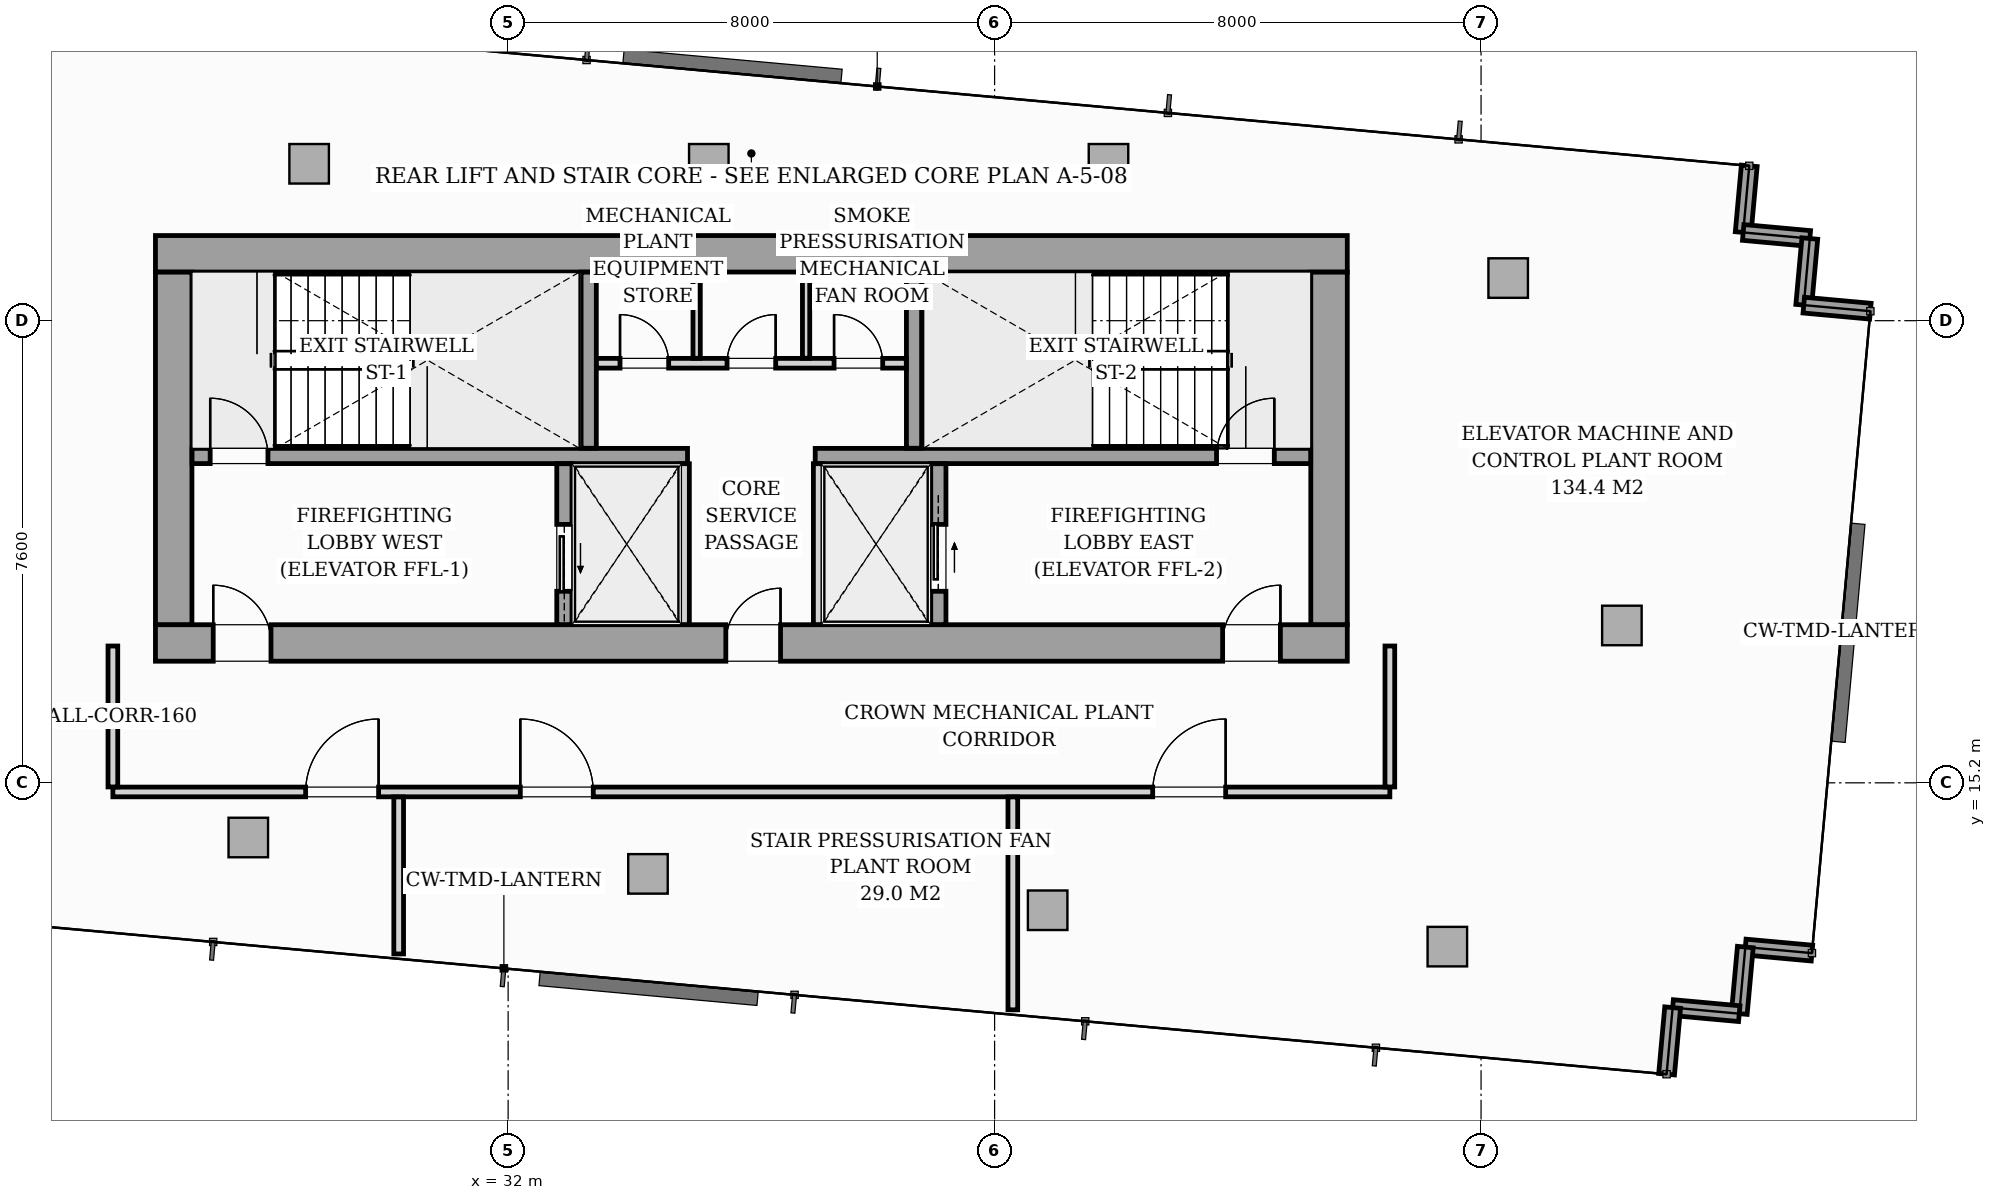
"""IFC4 building model, lengths in metres.
Left out: names, types, materials, properties, quantities, classifications, styles, units other than length and angle.
Written with IfcOpenShell. Run it as: python <this file> out.ifc"""

import sys

from ifc_helpers import new_model, si_unit, direction, frame, frame_2d, origin, origin_2d, place, context, subcontext, project, spatial, rectangle, i_section, extrude, source, transform, mapped, element, fill, save


model = new_model("IFC4")
c1 = context("Model", 3, precision=1e-05, world=origin(), true_north=direction((0.0, 1.0)))
c2 = subcontext(c1, "Body", "Model", "MODEL_VIEW")
j1 = project(units=[si_unit("LENGTHUNIT", "METRE"), si_unit("PLANEANGLEUNIT", "RADIAN")], contexts=[c1])
p1 = place(None, origin())
s1 = spatial("IfcSite", under=j1, at=p1, CompositionType="ELEMENT")
p2 = place(p1, origin())
s2 = spatial("IfcBuilding", under=s1, at=p2, CompositionType="ELEMENT")
p3 = place(p2, frame((0.0, 0.0, 283.8)))
s3 = spatial("IfcBuildingStorey", under=s2, at=p3, CompositionType="ELEMENT", Elevation=283.8)
m1 = source(origin(), c2, "Body", "SweptSolid", [
    extrude(i_section(OverallWidth=0.404, OverallDepth=0.407, WebThickness=0.027, FlangeThickness=0.044, FilletRadius=0.018, at=origin_2d()), origin(), (0.0, 0.0, 1.0), 6.496),
])
for number, where, z_axis, x_axis in (
    (1, (26.4, 17.4, 0.002), (0.0, 0.0, 1.0), (1.0, 0.0, 0.0)),
    (2, (33.12, 17.4, 0.002), (0.0, 0.0, 1.0), (1.0, 0.0, 0.0)),
    (3, (38.88, 17.4, 0.002), (0.0, 0.0, 1.0), (1.0, 0.0, 0.0)),
    (4, (45.6, 17.4, 0.002), (0.0, 0.0, 1.0), (1.0, 0.0, 0.0)),
    (5, (26.4, 24.0, 0.002), (0.0, 0.0, 1.0), (1.0, 0.0, 0.0)),
    (6, (33.12, 24.0, 0.002), (0.0, 0.0, 1.0), (1.0, 0.0, 0.0)),
    (7, (38.88, 24.0, 0.002), (0.0, 0.0, 1.0), (1.0, 0.0, 0.0)),
    (8, (45.6, 24.0, 0.002), (0.0, 0.0, 1.0), (1.0, 0.0, 0.0)),
):
    element("IfcColumn", number, at=place(p3, frame(where, z_axis=z_axis, x_axis=x_axis)), inside=s3, PredefinedType="PILASTER", context=c2, shape_type="MappedRepresentation", body=[
        mapped(m1, transform((0.0, 0.0, 0.0), scale=1.0)),
    ])
m2 = source(origin(), c2, "Body", "SweptSolid", [
    extrude(rectangle(XDim=0.65, YDim=0.65, at=origin_2d()), origin(), (0.0, 0.0, 1.0), 6.496),
])
for number, where, z_axis, x_axis in (
    (9, (27.727, 14.301, 0.002), (0.0, 0.0, 1.0), (0.996, -0.091, 0.0)),
    (10, (34.3, 13.703, 0.002), (0.0, 0.0, 1.0), (0.996, -0.091, 0.0)),
    (11, (40.873, 13.104, 0.002), (0.0, 0.0, 1.0), (0.996, -0.091, 0.0)),
    (12, (47.445, 12.506, 0.002), (0.0, 0.0, 1.0), (0.996, -0.091, 0.0)),
    (13, (28.728, 25.38, 0.002), (0.0, 0.0, 1.0), (0.996, -0.091, 0.0)),
    (14, (35.3, 25.38, 0.002), (0.0, 0.0, 1.0), (0.996, -0.091, 0.0)),
    (15, (41.873, 25.38, 0.002), (0.0, 0.0, 1.0), (0.996, -0.091, 0.0)),
    (16, (48.446, 23.501, 0.002), (0.0, 0.0, 1.0), (0.996, -0.091, 0.0)),
    (17, (50.316, 17.788, 0.002), (0.0, 0.0, 1.0), (0.996, -0.091, 0.0)),
):
    element("IfcColumn", number, at=place(p3, frame(where, z_axis=z_axis, x_axis=x_axis)), inside=s3, PredefinedType="COLUMN", context=c2, shape_type="MappedRepresentation", body=[
        mapped(m2, transform((0.0, 0.0, 0.0), scale=1.0)),
    ])
p4 = place(p3, frame((52.411, 25.346, 0.0), z_axis=(0.0, 0.0, 1.0), x_axis=(-0.09077588162, -0.995871346769, 0.0)))
e18 = element("IfcWall", 18, at=p4, inside=s3, PredefinedType="STANDARD", context=c2, shape_type="SweptSolid", body=[
    extrude(rectangle(XDim=1.1, YDim=0.26, at=frame_2d((0.55, 0.0))), origin(), (0.0, 0.0, 1.0), 6.22),
])
p5 = place(p3, frame((52.311, 24.251, 0.0), z_axis=(0.0, 0.0, 1.0), x_axis=(0.995893206468, -0.090535746043, 0.0)))
e19 = element("IfcWall", 19, at=p5, inside=s3, PredefinedType="STANDARD", context=c2, shape_type="SweptSolid", body=[
    extrude(rectangle(XDim=1.1, YDim=0.26, at=frame_2d((0.55, 0.0))), origin(), (0.0, 0.0, 1.0), 6.22),
])
for number, where, z_axis, x_axis in (
    (20, (53.406, 24.151, 0.0), (0.0, 0.0, 1.0), (-0.091, -0.996, 0.0)),
    (21, (53.307, 23.056, 0.0), (0.0, 0.0, 1.0), (0.996, -0.091, 0.0)),
    (22, (53.441, 12.4, 0.0), (0.0, 0.0, 1.0), (-0.996, 0.091, 0.0)),
    (23, (52.346, 12.5, 0.0), (0.0, 0.0, 1.0), (-0.091, -0.996, 0.0)),
    (24, (52.246, 11.404, 0.0), (0.0, 0.0, 1.0), (-0.996, 0.091, 0.0)),
    (25, (51.151, 11.504, 0.0), (0.0, 0.0, 1.0), (-0.091, -0.996, 0.0)),
):
    element("IfcWall", number, at=place(p3, frame(where, z_axis=z_axis, x_axis=x_axis)), inside=s3, PredefinedType="STANDARD", context=c2, shape_type="SweptSolid", body=[
        extrude(rectangle(XDim=1.1, YDim=0.26, at=frame_2d((0.55, 0.0))), origin(), (0.0, 0.0, 1.0), 6.22),
    ])
p6 = place(p3, frame((26.2, 17.5, 0.0), z_axis=(0.0, 0.0, 1.0), x_axis=(1.0, 0.0, 0.0)))
e26 = element("IfcWall", 26, at=p6, inside=s3, PredefinedType="SHEAR", context=c2, shape_type="SweptSolid", body=[
    extrude(rectangle(XDim=19.6, YDim=0.6, at=frame_2d((9.8, 0.0))), origin(), (0.0, 0.0, 1.0), 6.5),
])
p7 = place(p6, frame((0.95, 0.0, 0.0)))
e27 = element("IfcOpeningElement", 27, at=p7, cuts=e26, PredefinedType="OPENING", context=c2, shape_type="SweptSolid", body=[
    extrude(rectangle(XDim=0.95, YDim=2.06, at=frame_2d((0.475, 1.03))), frame((0.0, 0.31, 0.0), z_axis=(0.0, -1.0, 0.0), x_axis=(1.0, 0.0, 0.0)), (0.0, 0.0, 1.0), 0.62),
])
p8 = place(p6, frame((9.38, 0.0, 0.0)))
e28 = element("IfcOpeningElement", 28, at=p8, cuts=e26, PredefinedType="OPENING", context=c2, shape_type="SweptSolid", body=[
    extrude(rectangle(XDim=0.9, YDim=2.06, at=frame_2d((0.45, 1.03))), frame((0.0, 0.31, 0.0), z_axis=(0.0, -1.0, 0.0), x_axis=(1.0, 0.0, 0.0)), (0.0, 0.0, 1.0), 0.62),
])
p9 = place(p6, frame((17.55, 0.0, 0.0)))
e29 = element("IfcOpeningElement", 29, at=p9, cuts=e26, PredefinedType="OPENING", context=c2, shape_type="SweptSolid", body=[
    extrude(rectangle(XDim=0.95, YDim=2.06, at=frame_2d((0.475, 1.03))), frame((0.0, 0.31, 0.0), z_axis=(0.0, -1.0, 0.0), x_axis=(1.0, 0.0, 0.0)), (0.0, 0.0, 1.0), 0.62),
])
p10 = place(p3, frame((26.2, 23.9, 0.0), z_axis=(0.0, 0.0, 1.0), x_axis=(1.0, 0.0, 0.0)))
e30 = element("IfcWall", 30, at=p10, inside=s3, PredefinedType="SHEAR", context=c2, shape_type="SweptSolid", body=[
    extrude(rectangle(XDim=19.6, YDim=0.6, at=frame_2d((9.8, 0.0))), origin(), (0.0, 0.0, 1.0), 6.5),
])
for number, where, z_axis, x_axis in (
    (31, (26.5, 17.802, 0.0), (0.0, 0.0, 1.0), (0.0, 1.0, 0.0)),
    (32, (45.5, 17.802, 0.0), (0.0, 0.0, 1.0), (0.0, 1.0, 0.0)),
):
    element("IfcWall", number, at=place(p3, frame(where, z_axis=z_axis, x_axis=x_axis)), inside=s3, PredefinedType="SHEAR", context=c2, shape_type="SweptSolid", body=[
        extrude(rectangle(XDim=5.796, YDim=0.6, at=frame_2d((2.898, 0.0))), origin(), (0.0, 0.0, 1.0), 6.5),
    ])
p11 = place(p3, frame((26.802, 20.575, 0.0), z_axis=(0.0, 0.0, 1.0), x_axis=(1.0, 0.0, 0.0)))
e33 = element("IfcWall", 33, at=p11, inside=s3, PredefinedType="SOLIDWALL", context=c2, shape_type="SweptSolid", body=[
    extrude(rectangle(XDim=8.148, YDim=0.25, at=frame_2d((4.074, 0.0))), origin(), (0.0, 0.0, 1.0), 6.5),
])
p12 = place(p11, frame((0.298, 0.0, 0.0)))
e34 = element("IfcOpeningElement", 34, at=p12, cuts=e33, PredefinedType="OPENING", context=c2, shape_type="SweptSolid", body=[
    extrude(rectangle(XDim=0.95, YDim=2.06, at=frame_2d((0.475, 1.03))), frame((0.0, 0.135, 0.0), z_axis=(0.0, -1.0, 0.0), x_axis=(1.0, 0.0, 0.0)), (0.0, 0.0, 1.0), 0.27),
])
p13 = place(p3, frame((37.05, 20.575, 0.0), z_axis=(0.0, 0.0, 1.0), x_axis=(1.0, 0.0, 0.0)))
e35 = element("IfcWall", 35, at=p13, inside=s3, PredefinedType="SOLIDWALL", context=c2, shape_type="SweptSolid", body=[
    extrude(rectangle(XDim=8.148, YDim=0.25, at=frame_2d((4.074, 0.0))), origin(), (0.0, 0.0, 1.0), 6.5),
])
p14 = place(p13, frame((6.6, 0.0, 0.0)))
e36 = element("IfcOpeningElement", 36, at=p14, cuts=e35, PredefinedType="OPENING", context=c2, shape_type="SweptSolid", body=[
    extrude(rectangle(XDim=0.95, YDim=2.06, at=frame_2d((0.475, 1.03))), frame((0.0, 0.135, 0.0), z_axis=(0.0, -1.0, 0.0), x_axis=(1.0, 0.0, 0.0)), (0.0, 0.0, 1.0), 0.27),
])
for number, where, z_axis, x_axis in (
    (37, (33.325, 20.702, 0.0), (0.0, 0.0, 1.0), (0.0, 1.0, 0.0)),
    (38, (38.675, 20.702, 0.0), (0.0, 0.0, 1.0), (0.0, 1.0, 0.0)),
):
    element("IfcWall", number, at=place(p3, frame(where, z_axis=z_axis, x_axis=x_axis)), inside=s3, PredefinedType="SOLIDWALL", context=c2, shape_type="SweptSolid", body=[
        extrude(rectangle(XDim=2.896, YDim=0.25, at=frame_2d((1.448, 0.0))), origin(), (0.0, 0.0, 1.0), 6.5),
    ])
p15 = place(p3, frame((32.925, 17.802, 0.0), z_axis=(0.0, 0.0, 1.0), x_axis=(0.0, 1.0, 0.0)))
e39 = element("IfcWall", 39, at=p15, inside=s3, PredefinedType="SOLIDWALL", context=c2, shape_type="SweptSolid", body=[
    extrude(rectangle(XDim=2.646, YDim=0.25, at=frame_2d((1.323, 0.0))), origin(), (0.0, 0.0, 1.0), 6.5),
])
p16 = place(p15, frame((0.548, 0.0, 0.0)))
e40 = element("IfcOpeningElement", 40, at=p16, cuts=e39, PredefinedType="OPENING", context=c2, shape_type="SweptSolid", body=[
    extrude(rectangle(XDim=1.1, YDim=2.08, at=frame_2d((0.55, 1.04))), frame((0.0, 0.135, 0.0), z_axis=(0.0, -1.0, 0.0), x_axis=(1.0, 0.0, 0.0)), (0.0, 0.0, 1.0), 0.27),
])
for number, where, z_axis, x_axis in (
    (41, (34.9, 17.802, 0.0), (0.0, 0.0, 1.0), (0.0, 1.0, 0.0)),
    (42, (37.1, 17.802, 0.0), (0.0, 0.0, 1.0), (0.0, 1.0, 0.0)),
):
    element("IfcWall", number, at=place(p3, frame(where, z_axis=z_axis, x_axis=x_axis)), inside=s3, PredefinedType="PARTITIONING", context=c2, shape_type="SweptSolid", body=[
        extrude(rectangle(XDim=2.646, YDim=0.16, at=frame_2d((1.323, 0.0))), origin(), (0.0, 0.0, 1.0), 6.22),
    ])
p17 = place(p3, frame((39.075, 17.802, 0.0), z_axis=(0.0, 0.0, 1.0), x_axis=(0.0, 1.0, 0.0)))
e43 = element("IfcWall", 43, at=p17, inside=s3, PredefinedType="SOLIDWALL", context=c2, shape_type="SweptSolid", body=[
    extrude(rectangle(XDim=2.646, YDim=0.25, at=frame_2d((1.323, 0.0))), origin(), (0.0, 0.0, 1.0), 6.5),
])
p18 = place(p17, frame((0.548, 0.0, 0.0)))
e44 = element("IfcOpeningElement", 44, at=p18, cuts=e43, PredefinedType="OPENING", context=c2, shape_type="SweptSolid", body=[
    extrude(rectangle(XDim=1.1, YDim=2.08, at=frame_2d((0.55, 1.04))), frame((0.0, 0.135, 0.0), z_axis=(0.0, -1.0, 0.0), x_axis=(1.0, 0.0, 0.0)), (0.0, 0.0, 1.0), 0.27),
])
p19 = place(p3, frame((33.452, 22.1, 0.0), z_axis=(0.0, 0.0, 1.0), x_axis=(1.0, 0.0, 0.0)))
e45 = element("IfcWall", 45, at=p19, inside=s3, PredefinedType="PARTITIONING", context=c2, shape_type="SweptSolid", body=[
    extrude(rectangle(XDim=5.096, YDim=0.16, at=frame_2d((2.548, 0.0))), origin(), (0.0, 0.0, 1.0), 6.22),
])
p20 = place(p19, frame((0.388, 0.0, 0.0)))
e46 = element("IfcOpeningElement", 46, at=p20, cuts=e45, PredefinedType="OPENING", context=c2, shape_type="SweptSolid", body=[
    extrude(rectangle(XDim=0.8, YDim=2.05, at=frame_2d((0.4, 1.025))), frame((0.0, 0.09, 0.0), z_axis=(0.0, -1.0, 0.0), x_axis=(1.0, 0.0, 0.0)), (0.0, 0.0, 1.0), 0.18),
])
p21 = place(p19, frame((2.148, 0.0, 0.0)))
e47 = element("IfcOpeningElement", 47, at=p21, cuts=e45, PredefinedType="OPENING", context=c2, shape_type="SweptSolid", body=[
    extrude(rectangle(XDim=0.8, YDim=2.05, at=frame_2d((0.4, 1.025))), frame((0.0, 0.09, 0.0), z_axis=(0.0, -1.0, 0.0), x_axis=(1.0, 0.0, 0.0)), (0.0, 0.0, 1.0), 0.18),
])
p22 = place(p19, frame((3.908, 0.0, 0.0)))
e48 = element("IfcOpeningElement", 48, at=p22, cuts=e45, PredefinedType="OPENING", context=c2, shape_type="SweptSolid", body=[
    extrude(rectangle(XDim=0.8, YDim=2.05, at=frame_2d((0.4, 1.025))), frame((0.0, 0.09, 0.0), z_axis=(0.0, -1.0, 0.0), x_axis=(1.0, 0.0, 0.0)), (0.0, 0.0, 1.0), 0.18),
])
for number, where, z_axis, x_axis in (
    (49, (35.1, 22.182, 0.0), (0.0, 0.0, 1.0), (0.0, 1.0, 0.0)),
    (50, (36.9, 22.182, 0.0), (0.0, 0.0, 1.0), (0.0, 1.0, 0.0)),
):
    element("IfcWall", number, at=place(p3, frame(where, z_axis=z_axis, x_axis=x_axis)), inside=s3, PredefinedType="PARTITIONING", context=c2, shape_type="SweptSolid", body=[
        extrude(rectangle(XDim=1.416, YDim=0.12, at=frame_2d((0.708, 0.0))), origin(), (0.0, 0.0, 1.0), 6.22),
    ])
p23 = place(p3, frame((25.5, 15.05, 0.0), z_axis=(0.0, 0.0, 1.0), x_axis=(1.0, 0.0, 0.0)))
e51 = element("IfcWall", 51, at=p23, inside=s3, PredefinedType="PARTITIONING", context=c2, shape_type="SweptSolid", body=[
    extrude(rectangle(XDim=21.0, YDim=0.16, at=frame_2d((10.5, 0.0))), origin(), (0.0, 0.0, 1.0), 5.948),
])
p24 = place(p23, frame((3.17, 0.0, 0.0)))
e52 = element("IfcOpeningElement", 52, at=p24, cuts=e51, PredefinedType="OPENING", context=c2, shape_type="SweptSolid", body=[
    extrude(rectangle(XDim=1.2, YDim=2.08, at=frame_2d((0.6, 1.04))), frame((0.0, 0.09, 0.0), z_axis=(0.0, -1.0, 0.0), x_axis=(1.0, 0.0, 0.0)), (0.0, 0.0, 1.0), 0.18),
])
p25 = place(p23, frame((6.7, 0.0, 0.0)))
e53 = element("IfcOpeningElement", 53, at=p25, cuts=e51, PredefinedType="OPENING", context=c2, shape_type="SweptSolid", body=[
    extrude(rectangle(XDim=1.2, YDim=2.08, at=frame_2d((0.6, 1.04))), frame((0.0, 0.09, 0.0), z_axis=(0.0, -1.0, 0.0), x_axis=(1.0, 0.0, 0.0)), (0.0, 0.0, 1.0), 0.18),
])
p26 = place(p23, frame((17.1, 0.0, 0.0)))
e54 = element("IfcOpeningElement", 54, at=p26, cuts=e51, PredefinedType="OPENING", context=c2, shape_type="SweptSolid", body=[
    extrude(rectangle(XDim=1.2, YDim=2.08, at=frame_2d((0.6, 1.04))), frame((0.0, 0.09, 0.0), z_axis=(0.0, -1.0, 0.0), x_axis=(1.0, 0.0, 0.0)), (0.0, 0.0, 1.0), 0.18),
])
for number, where, z_axis, x_axis in (
    (55, (25.5, 15.132, 0.0), (0.0, 0.0, 1.0), (0.0, 1.0, 0.0)),
    (56, (46.5, 15.132, 0.0), (0.0, 0.0, 1.0), (0.0, 1.0, 0.0)),
):
    element("IfcWall", number, at=place(p3, frame(where, z_axis=z_axis, x_axis=x_axis)), inside=s3, PredefinedType="PARTITIONING", context=c2, shape_type="SweptSolid", body=[
        extrude(rectangle(XDim=2.318, YDim=0.16, at=frame_2d((1.159, 0.0))), origin(), (0.0, 0.0, 1.0), 6.22),
    ])
p27 = place(p3, frame((30.2, 12.386, 0.0), z_axis=(0.0, 0.0, 1.0), x_axis=(0.0, 1.0, 0.0)))
e57 = element("IfcWall", 57, at=p27, inside=s3, PredefinedType="PARTITIONING", context=c2, shape_type="SweptSolid", body=[
    extrude(rectangle(XDim=2.582, YDim=0.16, at=frame_2d((1.291, 0.0))), origin(), (0.0, 0.0, 1.0), 6.22),
])
p28 = place(p3, frame((40.3, 11.467, 0.0), z_axis=(0.0, 0.0, 1.0), x_axis=(0.0, 1.0, 0.0)))
e58 = element("IfcWall", 58, at=p28, inside=s3, PredefinedType="PARTITIONING", context=c2, shape_type="SweptSolid", body=[
    extrude(rectangle(XDim=3.501, YDim=0.16, at=frame_2d((1.75, 0.0))), origin(), (0.0, 0.0, 1.0), 6.22),
])
m3 = source(origin(), c2, "Body", "SweptSolid", [
    extrude(rectangle(XDim=0.95, YDim=2.06, at=frame_2d((0.475, 1.03))), frame((0.0, 0.025, 0.0), z_axis=(0.0, -1.0, 0.0), x_axis=(1.0, 0.0, 0.0)), (0.0, 0.0, 1.0), 0.05),
])
p29 = place(p7, origin())
e59 = element("IfcDoor", 59, at=p29, inside=s3, OperationType="SINGLE_SWING_LEFT", PredefinedType="DOOR", context=c2, shape_type="MappedRepresentation", body=[
    mapped(m3, transform((0.0, 0.0, 0.0), scale=1.0)),
])
fill(e27, e59)
m4 = source(origin(), c2, "Body", "SweptSolid", [
    extrude(rectangle(XDim=0.9, YDim=2.06, at=frame_2d((0.45, 1.03))), frame((0.0, 0.025, 0.0), z_axis=(0.0, -1.0, 0.0), x_axis=(1.0, 0.0, 0.0)), (0.0, 0.0, 1.0), 0.05),
])
p30 = place(p8, origin())
e60 = element("IfcDoor", 60, at=p30, inside=s3, OperationType="SINGLE_SWING_RIGHT", PredefinedType="DOOR", context=c2, shape_type="MappedRepresentation", body=[
    mapped(m4, transform((0.0, 0.0, 0.0), scale=1.0)),
])
fill(e28, e60)
p31 = place(p9, origin())
e61 = element("IfcDoor", 61, at=p31, inside=s3, OperationType="SINGLE_SWING_RIGHT", PredefinedType="DOOR", context=c2, shape_type="MappedRepresentation", body=[
    mapped(m3, transform((0.0, 0.0, 0.0), scale=1.0)),
])
fill(e29, e61)
p32 = place(p12, origin())
e62 = element("IfcDoor", 62, at=p32, inside=s3, OperationType="SINGLE_SWING_LEFT", PredefinedType="DOOR", context=c2, shape_type="MappedRepresentation", body=[
    mapped(m3, transform((0.0, 0.0, 0.0), scale=1.0)),
])
fill(e34, e62)
p33 = place(p14, origin())
e63 = element("IfcDoor", 63, at=p33, inside=s3, OperationType="SINGLE_SWING_RIGHT", PredefinedType="DOOR", context=c2, shape_type="MappedRepresentation", body=[
    mapped(m3, transform((0.0, 0.0, 0.0), scale=1.0)),
])
fill(e36, e63)
m5 = source(origin(), c2, "Body", "SweptSolid", [
    extrude(rectangle(XDim=1.1, YDim=2.08, at=frame_2d((0.55, 1.04))), frame((0.0, 0.025, 0.0), z_axis=(0.0, -1.0, 0.0), x_axis=(1.0, 0.0, 0.0)), (0.0, 0.0, 1.0), 0.05),
])
p34 = place(p16, origin())
e64 = element("IfcDoor", 64, at=p34, inside=s3, OperationType="SLIDING_TO_LEFT", PredefinedType="DOOR", context=c2, shape_type="MappedRepresentation", body=[
    mapped(m5, transform((0.0, 0.0, 0.0), scale=1.0)),
])
fill(e40, e64)
p35 = place(p18, origin())
e65 = element("IfcDoor", 65, at=p35, inside=s3, OperationType="SLIDING_TO_RIGHT", PredefinedType="DOOR", context=c2, shape_type="MappedRepresentation", body=[
    mapped(m5, transform((0.0, 0.0, 0.0), scale=1.0)),
])
fill(e44, e65)
m6 = source(origin(), c2, "Body", "SweptSolid", [
    extrude(rectangle(XDim=0.8, YDim=2.05, at=frame_2d((0.4, 1.025))), frame((0.0, 0.025, 0.0), z_axis=(0.0, -1.0, 0.0), x_axis=(1.0, 0.0, 0.0)), (0.0, 0.0, 1.0), 0.05),
])
p36 = place(p20, origin())
e66 = element("IfcDoor", 66, at=p36, inside=s3, OperationType="SINGLE_SWING_LEFT", PredefinedType="DOOR", context=c2, shape_type="MappedRepresentation", body=[
    mapped(m6, transform((0.0, 0.0, 0.0), scale=1.0)),
])
fill(e46, e66)
p37 = place(p21, origin())
e67 = element("IfcDoor", 67, at=p37, inside=s3, OperationType="SINGLE_SWING_RIGHT", PredefinedType="DOOR", context=c2, shape_type="MappedRepresentation", body=[
    mapped(m6, transform((0.0, 0.0, 0.0), scale=1.0)),
])
fill(e47, e67)
p38 = place(p22, origin())
e68 = element("IfcDoor", 68, at=p38, inside=s3, OperationType="SINGLE_SWING_LEFT", PredefinedType="DOOR", context=c2, shape_type="MappedRepresentation", body=[
    mapped(m6, transform((0.0, 0.0, 0.0), scale=1.0)),
])
fill(e48, e68)
m7 = source(origin(), c2, "Body", "SweptSolid", [
    extrude(rectangle(XDim=1.2, YDim=2.08, at=frame_2d((0.6, 1.04))), frame((0.0, 0.025, 0.0), z_axis=(0.0, -1.0, 0.0), x_axis=(1.0, 0.0, 0.0)), (0.0, 0.0, 1.0), 0.05),
])
p39 = place(p24, origin())
e69 = element("IfcDoor", 69, at=p39, inside=s3, OperationType="SINGLE_SWING_RIGHT", PredefinedType="DOOR", context=c2, shape_type="MappedRepresentation", body=[
    mapped(m7, transform((0.0, 0.0, 0.0), scale=1.0)),
])
fill(e52, e69)
p40 = place(p25, origin())
e70 = element("IfcDoor", 70, at=p40, inside=s3, OperationType="SINGLE_SWING_LEFT", PredefinedType="DOOR", context=c2, shape_type="MappedRepresentation", body=[
    mapped(m7, transform((0.0, 0.0, 0.0), scale=1.0)),
])
fill(e53, e70)
p41 = place(p26, origin())
e71 = element("IfcDoor", 71, at=p41, inside=s3, OperationType="SINGLE_SWING_RIGHT", PredefinedType="DOOR", context=c2, shape_type="MappedRepresentation", body=[
    mapped(m7, transform((0.0, 0.0, 0.0), scale=1.0)),
])
fill(e54, e71)
save(model, sys.argv[1])
